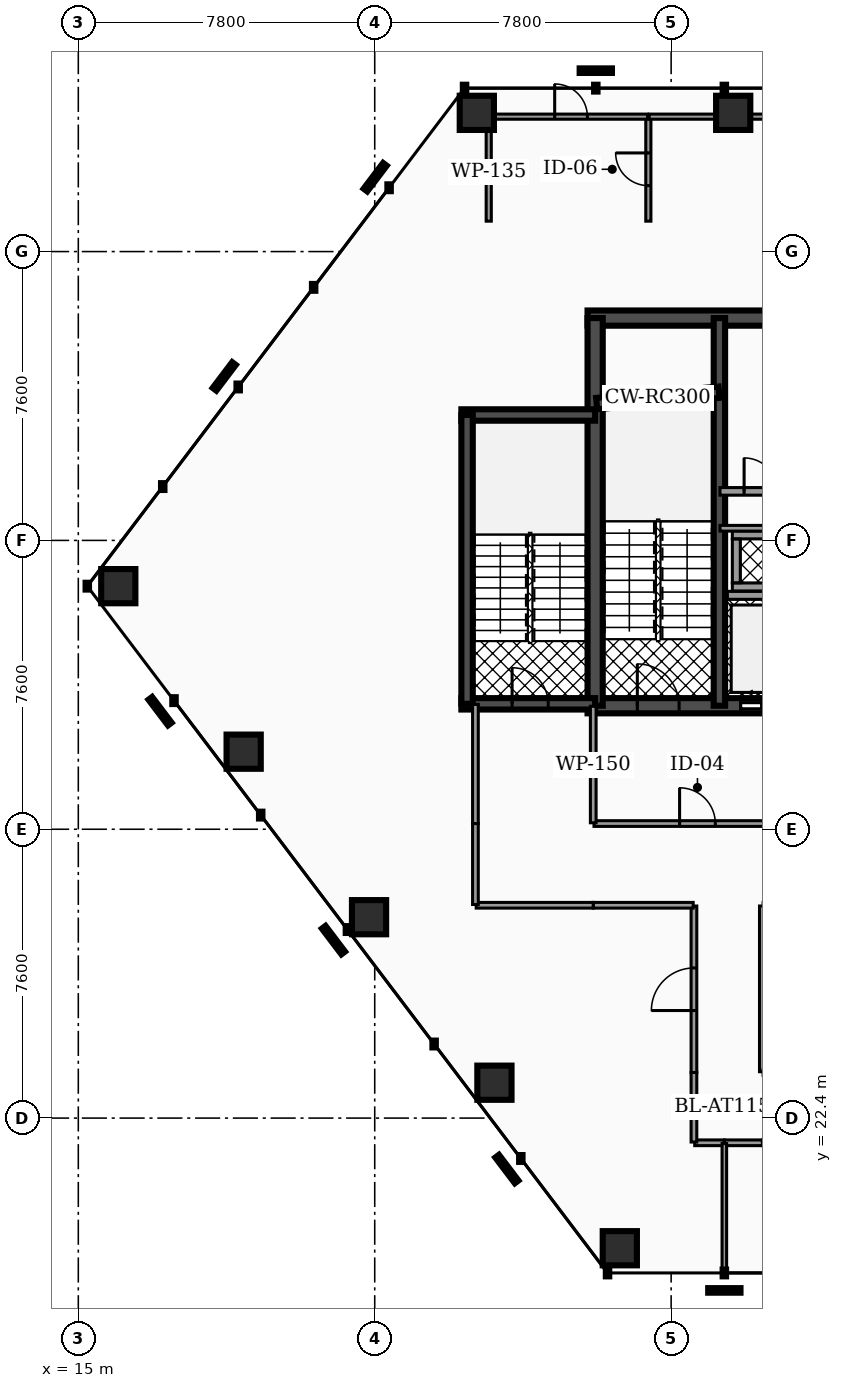
"""IFC4 building model, lengths in metres.
Left out: names, types, materials, properties, quantities, classifications, styles, units other than length and angle.
Written with IfcOpenShell. Run it as: python <this file> out.ifc"""

import sys

from ifc_helpers import new_model, si_unit, direction, frame, frame_2d, origin, origin_2d, place, context, subcontext, project, spatial, rectangle, hollow_rectangle, extrude, element, fill, save


model = new_model("IFC4")
c1 = context("Model", 3, precision=1e-05, world=origin(), true_north=direction((0.0, 1.0)))
c2 = subcontext(c1, "Body", "Model", "MODEL_VIEW")
j1 = project(units=[si_unit("LENGTHUNIT", "METRE"), si_unit("PLANEANGLEUNIT", "RADIAN")], contexts=[c1])
p1 = place(None, origin())
s1 = spatial("IfcSite", under=j1, at=p1, CompositionType="ELEMENT")
p2 = place(p1, origin())
s2 = spatial("IfcBuilding", under=s1, at=p2, CompositionType="ELEMENT")
p3 = place(p2, frame((0.0, 0.0, 96.9)))
s3 = spatial("IfcBuildingStorey", under=s2, at=p3, CompositionType="ELEMENT", Elevation=96.9)
p4 = place(p3, frame((28.4, 43.45, 0.0), z_axis=(0.0, 0.0, 1.0), x_axis=(1.0, 0.0, 0.0)))
e1 = element("IfcWall", 1, at=p4, inside=s3, PredefinedType="SHEAR", context=c2, shape_type="SweptSolid", body=[
    extrude(rectangle(XDim=20.06, YDim=0.4, at=frame_2d((10.03, 0.0))), origin(), (0.0, 0.0, 1.0), 3.82),
])
p5 = place(p3, frame((28.4, 33.25, 0.0), z_axis=(0.0, 0.0, 1.0), x_axis=(1.0, 0.0, 0.0)))
e2 = element("IfcWall", 2, at=p5, inside=s3, PredefinedType="SHEAR", context=c2, shape_type="SweptSolid", body=[
    extrude(rectangle(XDim=20.06, YDim=0.4, at=frame_2d((10.03, 0.0))), origin(), (0.0, 0.0, 1.0), 3.82),
])
p6 = place(p5, frame((4.03, 0.0, 0.0)))
e3 = element("IfcOpeningElement", 3, at=p6, cuts=e2, PredefinedType="OPENING", context=c2, shape_type="SweptSolid", body=[
    extrude(rectangle(XDim=1.1, YDim=2.15, at=frame_2d((0.55, 1.075))), frame((0.0, 0.21, 0.0), z_axis=(0.0, -1.0, 0.0), x_axis=(1.0, 0.0, 0.0)), (0.0, 0.0, 1.0), 0.42),
])
p7 = place(p5, frame((14.87, 0.0, 0.0)))
e4 = element("IfcOpeningElement", 4, at=p7, cuts=e2, PredefinedType="OPENING", context=c2, shape_type="SweptSolid", body=[
    extrude(rectangle(XDim=1.1, YDim=2.15, at=frame_2d((0.55, 1.075))), frame((0.0, 0.21, 0.0), z_axis=(0.0, -1.0, 0.0), x_axis=(1.0, 0.0, 0.0)), (0.0, 0.0, 1.0), 0.42),
])
p8 = place(p5, frame((1.31, 0.0, 0.0)))
e5 = element("IfcOpeningElement", 5, at=p8, cuts=e2, PredefinedType="OPENING", context=c2, shape_type="SweptSolid", body=[
    extrude(rectangle(XDim=1.1, YDim=2.2, at=frame_2d((0.55, 1.1))), frame((0.0, 0.21, 0.0), z_axis=(0.0, -1.0, 0.0), x_axis=(1.0, 0.0, 0.0)), (0.0, 0.0, 1.0), 0.42),
])
p9 = place(p5, frame((9.44, 0.0, 0.0)))
e6 = element("IfcOpeningElement", 6, at=p9, cuts=e2, PredefinedType="OPENING", context=c2, shape_type="SweptSolid", body=[
    extrude(rectangle(XDim=1.12, YDim=2.05, at=frame_2d((0.56, 1.025))), frame((0.0, 0.21, 0.0), z_axis=(0.0, -1.0, 0.0), x_axis=(1.0, 0.0, 0.0)), (0.0, 0.0, 1.0), 0.42),
])
p10 = place(p5, frame((17.65, 0.0, 0.0)))
e7 = element("IfcOpeningElement", 7, at=p10, cuts=e2, PredefinedType="OPENING", context=c2, shape_type="SweptSolid", body=[
    extrude(rectangle(XDim=1.1, YDim=2.2, at=frame_2d((0.55, 1.1))), frame((0.0, 0.21, 0.0), z_axis=(0.0, -1.0, 0.0), x_axis=(1.0, 0.0, 0.0)), (0.0, 0.0, 1.0), 0.42),
])
p11 = place(p3, frame((28.6, 33.25, 0.0), z_axis=(0.0, 0.0, 1.0), x_axis=(0.0, 1.0, 0.0)))
e8 = element("IfcWall", 8, at=p11, inside=s3, PredefinedType="SHEAR", context=c2, shape_type="SweptSolid", body=[
    extrude(rectangle(XDim=10.2, YDim=0.4, at=frame_2d((5.1, 0.0))), origin(), (0.0, 0.0, 1.0), 3.82),
])
p12 = place(p3, frame((31.87, 33.25, 0.0), z_axis=(0.0, 0.0, 1.0), x_axis=(0.0, 1.0, 0.0)))
e9 = element("IfcWall", 9, at=p12, inside=s3, PredefinedType="SHEAR", context=c2, shape_type="SweptSolid", body=[
    extrude(rectangle(XDim=10.2, YDim=0.3, at=frame_2d((5.1, 0.0))), origin(), (0.0, 0.0, 1.0), 3.82),
])
p13 = place(p3, frame((28.64, 41.2, 0.0), z_axis=(0.0, 0.0, 1.0), x_axis=(0.995687118776, 0.092774789157, 0.0)))
e10 = element("IfcWall", 10, at=p13, inside=s3, PredefinedType="SHEAR", context=c2, shape_type="SweptSolid", body=[
    extrude(rectangle(XDim=3.234, YDim=0.3, at=frame_2d((1.617, 0.0))), origin(), (0.0, 0.0, 1.0), 3.82),
])
p14 = place(p3, frame((25.08, 40.9, 0.0), z_axis=(0.0, 0.0, 1.0), x_axis=(1.0, 0.0, 0.0)))
e11 = element("IfcWall", 11, at=p14, inside=s3, PredefinedType="SHEAR", context=c2, shape_type="SweptSolid", body=[
    extrude(rectangle(XDim=3.52, YDim=0.3, at=frame_2d((1.76, 0.0))), origin(), (0.0, 0.0, 1.0), 3.82),
])
p15 = place(p3, frame((25.08, 33.3, 0.0), z_axis=(0.0, 0.0, 1.0), x_axis=(1.0, 0.0, 0.0)))
e12 = element("IfcWall", 12, at=p15, inside=s3, PredefinedType="SHEAR", context=c2, shape_type="SweptSolid", body=[
    extrude(rectangle(XDim=3.52, YDim=0.3, at=frame_2d((1.76, 0.0))), origin(), (0.0, 0.0, 1.0), 3.82),
])
p16 = place(p15, frame((1.335, 0.0, 0.0)))
e13 = element("IfcOpeningElement", 13, at=p16, cuts=e12, PredefinedType="OPENING", context=c2, shape_type="SweptSolid", body=[
    extrude(rectangle(XDim=0.95, YDim=2.2, at=frame_2d((0.475, 1.1))), frame((0.0, 0.16, 0.0), z_axis=(0.0, -1.0, 0.0), x_axis=(1.0, 0.0, 0.0)), (0.0, 0.0, 1.0), 0.32),
])
p17 = place(p3, frame((25.23, 33.3, 0.0), z_axis=(0.0, 0.0, 1.0), x_axis=(0.0, 1.0, 0.0)))
e14 = element("IfcWall", 14, at=p17, inside=s3, PredefinedType="SHEAR", context=c2, shape_type="SweptSolid", body=[
    extrude(rectangle(XDim=7.6, YDim=0.3, at=frame_2d((3.8, 0.0))), origin(), (0.0, 0.0, 1.0), 3.82),
])
for number, where, z_axis, x_axis in (
    (15, (32.233, 48.85, 0.0), (0.0, 0.0, 1.0), (1.0, 0.0, 0.0)),
    (16, (25.487, 48.85, 0.0), (0.0, 0.0, 1.0), (1.0, 0.0, 0.0)),
    (17, (16.052, 36.396, 0.0), (0.0, 0.0, 1.0), (1.0, 0.0, 0.0)),
    (18, (19.351, 32.041, 0.0), (0.0, 0.0, 1.0), (1.0, 0.0, 0.0)),
    (19, (22.65, 27.686, 0.0), (0.0, 0.0, 1.0), (1.0, 0.0, 0.0)),
    (20, (25.95, 23.331, 0.0), (0.0, 0.0, 1.0), (1.0, 0.0, 0.0)),
    (21, (29.249, 18.976, 0.0), (0.0, 0.0, 1.0), (1.0, 0.0, 0.0)),
):
    element("IfcColumn", number, at=place(p3, frame(where, z_axis=z_axis, x_axis=x_axis)), inside=s3, PredefinedType="COLUMN", context=c2, shape_type="SweptSolid", body=[
        extrude(hollow_rectangle(XDim=0.9, YDim=0.9, WallThickness=0.045, at=origin_2d()), origin(), (0.0, 0.0, 1.0), 3.82),
    ])
p18 = place(p3, frame((32.08, 36.155, 0.0), z_axis=(0.0, 0.0, 1.0), x_axis=(1.0, 0.0, 0.0)))
e22 = element("IfcWall", 22, at=p18, inside=s3, PredefinedType="SOLIDWALL", context=c2, shape_type="SweptSolid", body=[
    extrude(rectangle(XDim=1.8, YDim=0.21, at=frame_2d((0.9, 0.0))), origin(), (0.0, 0.0, 1.0), 2.792),
])
for number, where, z_axis, x_axis in (
    (23, (32.21, 36.375, 0.0), (0.0, 0.0, 1.0), (1.0, 0.0, 0.0)),
    (24, (32.21, 37.745, 0.0), (0.0, 0.0, 1.0), (1.0, 0.0, 0.0)),
):
    element("IfcWall", number, at=place(p3, frame(where, z_axis=z_axis, x_axis=x_axis)), inside=s3, PredefinedType="SOLIDWALL", context=c2, shape_type="SweptSolid", body=[
        extrude(rectangle(XDim=1.6, YDim=0.21, at=frame_2d((0.8, 0.0))), origin(), (0.0, 0.0, 1.0), 3.82),
    ])
p19 = place(p3, frame((32.315, 36.485, 0.0), z_axis=(0.0, 0.0, 1.0), x_axis=(0.0, 1.0, 0.0)))
e25 = element("IfcWall", 25, at=p19, inside=s3, PredefinedType="SOLIDWALL", context=c2, shape_type="SweptSolid", body=[
    extrude(rectangle(XDim=1.15, YDim=0.21, at=frame_2d((0.575, 0.0))), origin(), (0.0, 0.0, 1.0), 3.82),
])
p20 = place(p3, frame((31.885, 37.92, 0.0), z_axis=(0.0, 0.0, 1.0), x_axis=(1.0, 0.0, 0.0)))
e26 = element("IfcWall", 26, at=p20, inside=s3, PredefinedType="PARTITIONING", context=c2, shape_type="SweptSolid", body=[
    extrude(rectangle(XDim=3.295, YDim=0.15, at=frame_2d((1.647, 0.0))), origin(), (0.0, 0.0, 1.0), 2.777),
])
p21 = place(p3, frame((31.885, 38.89, 0.0), z_axis=(0.0, 0.0, 1.0), x_axis=(1.0, 0.0, 0.0)))
e27 = element("IfcWall", 27, at=p21, inside=s3, PredefinedType="PARTITIONING", context=c2, shape_type="SweptSolid", body=[
    extrude(rectangle(XDim=2.15, YDim=0.2, at=frame_2d((1.075, 0.0))), origin(), (0.0, 0.0, 1.0), 2.777),
])
p22 = place(p21, frame((0.635, 0.0, 0.0)))
e28 = element("IfcOpeningElement", 28, at=p22, cuts=e27, PredefinedType="OPENING", context=c2, shape_type="SweptSolid", body=[
    extrude(rectangle(XDim=0.88, YDim=2.05, at=frame_2d((0.44, 1.025))), frame((0.0, 0.11, 0.0), z_axis=(0.0, -1.0, 0.0), x_axis=(1.0, 0.0, 0.0)), (0.0, 0.0, 1.0), 0.22),
])
p23 = place(p3, frame((28.57, 30.15, 0.0), z_axis=(0.0, 0.0, 1.0), x_axis=(1.0, 0.0, 0.0)))
e29 = element("IfcWall", 29, at=p23, inside=s3, PredefinedType="PARTITIONING", context=c2, shape_type="SweptSolid", body=[
    extrude(rectangle(XDim=5.445, YDim=0.15, at=frame_2d((2.722, 0.0))), origin(), (0.0, 0.0, 1.0), 2.777),
])
p24 = place(p23, frame((2.252, 0.0, 0.0)))
e30 = element("IfcOpeningElement", 30, at=p24, cuts=e29, PredefinedType="OPENING", context=c2, shape_type="SweptSolid", body=[
    extrude(rectangle(XDim=0.94, YDim=2.05, at=frame_2d((0.47, 1.025))), frame((0.0, 0.085, 0.0), z_axis=(0.0, -1.0, 0.0), x_axis=(1.0, 0.0, 0.0)), (0.0, 0.0, 1.0), 0.17),
])
p25 = place(p3, frame((28.55, 30.17, 0.0), z_axis=(0.0, 0.0, 1.0), x_axis=(0.0, 1.0, 0.0)))
e31 = element("IfcWall", 31, at=p25, inside=s3, PredefinedType="PARTITIONING", context=c2, shape_type="SweptSolid", body=[
    extrude(rectangle(XDim=3.065, YDim=0.15, at=frame_2d((1.533, 0.0))), origin(), (0.0, 0.0, 1.0), 2.777),
])
p26 = place(p3, frame((33.0, 21.75, 0.0), z_axis=(0.0, 0.0, 1.0), x_axis=(1.0, 0.0, 0.0)))
e32 = element("IfcWall", 32, at=p26, inside=s3, PredefinedType="PARTITIONING", context=c2, shape_type="SweptSolid", body=[
    extrude(rectangle(XDim=10.8, YDim=0.15, at=frame_2d((5.4, 0.0))), origin(), (0.0, 0.0, 1.0), 2.777),
])
p27 = place(p26, frame((4.93, 0.0, 0.0)))
e33 = element("IfcOpeningElement", 33, at=p27, cuts=e32, PredefinedType="OPENING", context=c2, shape_type="SweptSolid", body=[
    extrude(rectangle(XDim=0.94, YDim=2.05, at=frame_2d((0.47, 1.025))), frame((0.0, 0.085, 0.0), z_axis=(0.0, -1.0, 0.0), x_axis=(1.0, 0.0, 0.0)), (0.0, 0.0, 1.0), 0.17),
])
p28 = place(p3, frame((32.005, 21.75, 0.0), z_axis=(0.0, 0.0, 1.0), x_axis=(1.0, 0.0, 0.0)))
e34 = element("IfcWall", 34, at=p28, inside=s3, PredefinedType="PARTITIONING", context=c2, shape_type="SweptSolid", body=[
    extrude(rectangle(XDim=0.995, YDim=0.15, at=frame_2d((0.498, 0.0))), origin(), (0.0, 0.0, 1.0), 2.777),
])
p29 = place(p3, frame((31.22, 21.75, 0.0), z_axis=(0.0, 0.0, 1.0), x_axis=(1.0, 0.0, 0.0)))
e35 = element("IfcWall", 35, at=p29, inside=s3, PredefinedType="PARTITIONING", context=c2, shape_type="SweptSolid", body=[
    extrude(rectangle(XDim=0.775, YDim=0.15, at=frame_2d((0.388, 0.0))), origin(), (0.0, 0.0, 1.0), 2.777),
])
p30 = place(p3, frame((31.2, 21.77, 0.0), z_axis=(0.0, 0.0, 1.0), x_axis=(0.0, 1.0, 0.0)))
e36 = element("IfcWall", 36, at=p30, inside=s3, PredefinedType="PARTITIONING", context=c2, shape_type="SweptSolid", body=[
    extrude(rectangle(XDim=1.83, YDim=0.15, at=frame_2d((0.915, 0.0))), origin(), (0.0, 0.0, 1.0), 2.777),
])
p31 = place(p3, frame((31.2, 23.6, 0.0), z_axis=(0.0, 0.0, 1.0), x_axis=(0.0, 1.0, 0.0)))
e37 = element("IfcWall", 37, at=p31, inside=s3, PredefinedType="PARTITIONING", context=c2, shape_type="SweptSolid", body=[
    extrude(rectangle(XDim=4.38, YDim=0.15, at=frame_2d((2.19, 0.0))), origin(), (0.0, 0.0, 1.0), 2.777),
])
p32 = place(p31, frame((1.63, 0.0, 0.0)))
e38 = element("IfcOpeningElement", 38, at=p32, cuts=e37, PredefinedType="OPENING", context=c2, shape_type="SweptSolid", body=[
    extrude(rectangle(XDim=1.12, YDim=2.05, at=frame_2d((0.56, 1.025))), frame((0.0, 0.085, 0.0), z_axis=(0.0, -1.0, 0.0), x_axis=(1.0, 0.0, 0.0)), (0.0, 0.0, 1.0), 0.17),
])
p33 = place(p3, frame((28.55, 28.0, 0.0), z_axis=(0.0, 0.0, 1.0), x_axis=(1.0, 0.0, 0.0)))
e39 = element("IfcWall", 39, at=p33, inside=s3, PredefinedType="PARTITIONING", context=c2, shape_type="SweptSolid", body=[
    extrude(rectangle(XDim=2.63, YDim=0.15, at=frame_2d((1.315, 0.0))), origin(), (0.0, 0.0, 1.0), 2.777),
])
p34 = place(p3, frame((25.47, 28.0, 0.0), z_axis=(0.0, 0.0, 1.0), x_axis=(1.0, 0.0, 0.0)))
e40 = element("IfcWall", 40, at=p34, inside=s3, PredefinedType="PARTITIONING", context=c2, shape_type="SweptSolid", body=[
    extrude(rectangle(XDim=3.08, YDim=0.15, at=frame_2d((1.54, 0.0))), origin(), (0.0, 0.0, 1.0), 2.777),
])
p35 = place(p3, frame((25.45, 28.02, 0.0), z_axis=(0.0, 0.0, 1.0), x_axis=(0.0, 1.0, 0.0)))
e41 = element("IfcWall", 41, at=p35, inside=s3, PredefinedType="PARTITIONING", context=c2, shape_type="SweptSolid", body=[
    extrude(rectangle(XDim=2.13, YDim=0.15, at=frame_2d((1.065, 0.0))), origin(), (0.0, 0.0, 1.0), 2.777),
])
p36 = place(p3, frame((25.45, 30.15, 0.0), z_axis=(0.0, 0.0, 1.0), x_axis=(0.0, 1.0, 0.0)))
e42 = element("IfcWall", 42, at=p36, inside=s3, PredefinedType="PARTITIONING", context=c2, shape_type="SweptSolid", body=[
    extrude(rectangle(XDim=3.135, YDim=0.15, at=frame_2d((1.567, 0.0))), origin(), (0.0, 0.0, 1.0), 2.777),
])
p37 = place(p3, frame((33.0, 23.62, 0.0), z_axis=(0.0, 0.0, 1.0), x_axis=(0.0, 1.0, 0.0)))
e43 = element("IfcWall", 43, at=p37, inside=s3, PredefinedType="PARTITIONING", context=c2, shape_type="SweptSolid", body=[
    extrude(rectangle(XDim=4.36, YDim=0.15, at=frame_2d((2.18, 0.0))), origin(), (0.0, 0.0, 1.0), 2.777),
])
p38 = place(p3, frame((30.0, 46.0, 0.0), z_axis=(0.0, 0.0, 1.0), x_axis=(0.0, 1.0, 0.0)))
e44 = element("IfcWall", 44, at=p38, inside=s3, PredefinedType="PARTITIONING", context=c2, shape_type="SweptSolid", body=[
    extrude(rectangle(XDim=2.73, YDim=0.135, at=frame_2d((1.365, 0.0))), origin(), (0.0, 0.0, 1.0), 2.777),
])
p39 = place(p38, frame((0.935, 0.0, 0.0)))
e45 = element("IfcOpeningElement", 45, at=p39, cuts=e44, PredefinedType="OPENING", context=c2, shape_type="SweptSolid", body=[
    extrude(rectangle(XDim=0.86, YDim=2.05, at=frame_2d((0.43, 1.025))), frame((0.0, 0.077, 0.0), z_axis=(0.0, -1.0, 0.0), x_axis=(1.0, 0.0, 0.0)), (0.0, 0.0, 1.0), 0.155),
])
p40 = place(p3, frame((25.951, 48.75, 0.0), z_axis=(0.0, 0.0, 1.0), x_axis=(1.0, 0.0, 0.0)))
e46 = element("IfcWall", 46, at=p40, inside=s3, PredefinedType="PARTITIONING", context=c2, shape_type="SweptSolid", body=[
    extrude(rectangle(XDim=4.029, YDim=0.135, at=frame_2d((2.015, 0.0))), origin(), (0.0, 0.0, 1.0), 2.777),
])
p41 = place(p40, frame((1.584, 0.0, 0.0)))
e47 = element("IfcOpeningElement", 47, at=p41, cuts=e46, PredefinedType="OPENING", context=c2, shape_type="SweptSolid", body=[
    extrude(rectangle(XDim=0.86, YDim=2.05, at=frame_2d((0.43, 1.025))), frame((0.0, 0.077, 0.0), z_axis=(0.0, -1.0, 0.0), x_axis=(1.0, 0.0, 0.0)), (0.0, 0.0, 1.0), 0.155),
])
p42 = place(p3, frame((25.8, 46.0, 0.0), z_axis=(0.0, 0.0, 1.0), x_axis=(0.0, 1.0, 0.0)))
e48 = element("IfcWall", 48, at=p42, inside=s3, PredefinedType="PARTITIONING", context=c2, shape_type="SweptSolid", body=[
    extrude(rectangle(XDim=2.599, YDim=0.135, at=frame_2d((1.3, 0.0))), origin(), (0.0, 0.0, 1.0), 2.777),
])
p43 = place(p3, frame((30.02, 48.75, 0.0), z_axis=(0.0, 0.0, 1.0), x_axis=(1.0, 0.0, 0.0)))
e49 = element("IfcWall", 49, at=p43, inside=s3, PredefinedType="PARTITIONING", context=c2, shape_type="SweptSolid", body=[
    extrude(rectangle(XDim=1.755, YDim=0.135, at=frame_2d((0.877, 0.0))), origin(), (0.0, 0.0, 1.0), 2.777),
])
p44 = place(p3, frame((32.198, 48.75, 0.0), z_axis=(0.0, 0.0, 1.0), x_axis=(1.0, 0.0, 0.0)))
e50 = element("IfcWall", 50, at=p44, inside=s3, PredefinedType="PARTITIONING", context=c2, shape_type="SweptSolid", body=[
    extrude(rectangle(XDim=1.982, YDim=0.135, at=frame_2d((0.991, 0.0))), origin(), (0.0, 0.0, 1.0), 2.777),
])
p45 = place(p3, frame((32.0, 18.341, 0.0), z_axis=(0.0, 0.0, 1.0), x_axis=(0.0, 1.0, 0.0)))
e51 = element("IfcWall", 51, at=p45, inside=s3, PredefinedType="PARTITIONING", context=c2, shape_type="SweptSolid", body=[
    extrude(rectangle(XDim=3.389, YDim=0.12, at=frame_2d((1.695, 0.0))), origin(), (0.0, 0.0, 1.0), 2.777),
])
p46 = place(p3, frame((32.0, 48.977, 0.0), z_axis=(0.0, 0.0, 1.0), x_axis=(0.0, 1.0, 0.0)))
e52 = element("IfcWall", 52, at=p46, inside=s3, PredefinedType="PARTITIONING", context=c2, shape_type="SweptSolid", body=[
    extrude(rectangle(XDim=0.509, YDim=0.12, at=frame_2d((0.254, 0.0))), origin(), (0.0, 0.0, 1.0), 2.777),
])
p47 = place(p6, origin())
e53 = element("IfcDoor", 53, at=p47, inside=s3, OperationType="SLIDING_TO_LEFT", PredefinedType="DOOR", context=c2, shape_type="SweptSolid", body=[
    extrude(rectangle(XDim=1.1, YDim=2.15, at=frame_2d((0.55, 1.075))), frame((0.0, 0.025, 0.0), z_axis=(0.0, -1.0, 0.0), x_axis=(1.0, 0.0, 0.0)), (0.0, 0.0, 1.0), 0.05),
])
fill(e3, e53)
p48 = place(p8, origin())
e54 = element("IfcDoor", 54, at=p48, inside=s3, OperationType="SINGLE_SWING_LEFT", PredefinedType="DOOR", context=c2, shape_type="SweptSolid", body=[
    extrude(rectangle(XDim=1.1, YDim=2.2, at=frame_2d((0.55, 1.1))), frame((0.0, 0.025, 0.0), z_axis=(0.0, -1.0, 0.0), x_axis=(1.0, 0.0, 0.0)), (0.0, 0.0, 1.0), 0.05),
])
fill(e5, e54)
p49 = place(p16, origin())
e55 = element("IfcDoor", 55, at=p49, inside=s3, OperationType="SINGLE_SWING_LEFT", PredefinedType="DOOR", context=c2, shape_type="SweptSolid", body=[
    extrude(rectangle(XDim=0.95, YDim=2.2, at=frame_2d((0.475, 1.1))), frame((0.0, 0.025, 0.0), z_axis=(0.0, -1.0, 0.0), x_axis=(1.0, 0.0, 0.0)), (0.0, 0.0, 1.0), 0.05),
])
fill(e13, e55)
p50 = place(p22, origin())
e56 = element("IfcDoor", 56, at=p50, inside=s3, OperationType="SINGLE_SWING_LEFT", PredefinedType="DOOR", context=c2, shape_type="SweptSolid", body=[
    extrude(rectangle(XDim=0.88, YDim=2.05, at=frame_2d((0.44, 1.025))), frame((0.0, 0.025, 0.0), z_axis=(0.0, -1.0, 0.0), x_axis=(1.0, 0.0, 0.0)), (0.0, 0.0, 1.0), 0.05),
])
fill(e28, e56)
p51 = place(p24, origin())
e57 = element("IfcDoor", 57, at=p51, inside=s3, OperationType="SINGLE_SWING_LEFT", PredefinedType="DOOR", context=c2, shape_type="SweptSolid", body=[
    extrude(rectangle(XDim=0.94, YDim=2.05, at=frame_2d((0.47, 1.025))), frame((0.0, 0.025, 0.0), z_axis=(0.0, -1.0, 0.0), x_axis=(1.0, 0.0, 0.0)), (0.0, 0.0, 1.0), 0.05),
])
fill(e30, e57)
p52 = place(p32, origin())
e58 = element("IfcDoor", 58, at=p52, inside=s3, OperationType="SINGLE_SWING_LEFT", PredefinedType="DOOR", context=c2, shape_type="SweptSolid", body=[
    extrude(rectangle(XDim=1.12, YDim=2.05, at=frame_2d((0.56, 1.025))), frame((0.0, 0.025, 0.0), z_axis=(0.0, -1.0, 0.0), x_axis=(1.0, 0.0, 0.0)), (0.0, 0.0, 1.0), 0.05),
])
fill(e38, e58)
p53 = place(p39, origin())
e59 = element("IfcDoor", 59, at=p53, inside=s3, OperationType="SINGLE_SWING_RIGHT", PredefinedType="DOOR", context=c2, shape_type="SweptSolid", body=[
    extrude(rectangle(XDim=0.86, YDim=2.05, at=frame_2d((0.43, 1.025))), frame((0.0, 0.025, 0.0), z_axis=(0.0, -1.0, 0.0), x_axis=(1.0, 0.0, 0.0)), (0.0, 0.0, 1.0), 0.05),
])
fill(e45, e59)
p54 = place(p41, origin())
e60 = element("IfcDoor", 60, at=p54, inside=s3, OperationType="SINGLE_SWING_LEFT", PredefinedType="DOOR", context=c2, shape_type="SweptSolid", body=[
    extrude(rectangle(XDim=0.86, YDim=2.05, at=frame_2d((0.43, 1.025))), frame((0.0, 0.025, 0.0), z_axis=(0.0, -1.0, 0.0), x_axis=(1.0, 0.0, 0.0)), (0.0, 0.0, 1.0), 0.05),
])
fill(e47, e60)
save(model, sys.argv[1])
